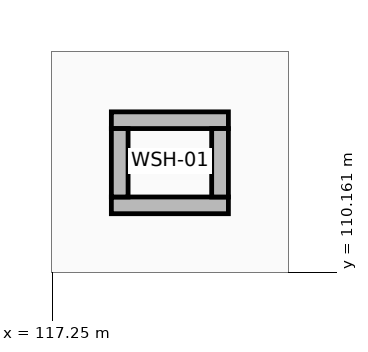
"""IFC4 building model, lengths in metres.
Left out: names, types, materials, properties, quantities, classifications, styles, units other than length and angle.
Written with IfcOpenShell. Run it as: python <this file> out.ifc"""

import sys

from ifc_helpers import new_model, si_unit, direction, frame, frame_2d, origin, place, context, subcontext, project, spatial, rectangle, extrude, element, save


model = new_model("IFC4")
c1 = context("Model", 3, precision=1e-05, world=origin(), true_north=direction((0.0, 1.0)))
c2 = subcontext(c1, "Body", "Model", "MODEL_VIEW")
j1 = project(units=[si_unit("LENGTHUNIT", "METRE"), si_unit("PLANEANGLEUNIT", "RADIAN")], contexts=[c1])
p1 = place(None, origin())
s1 = spatial("IfcSite", under=j1, at=p1, CompositionType="ELEMENT")
p2 = place(p1, origin())
s2 = spatial("IfcBuilding", under=s1, at=p2, CompositionType="ELEMENT")
p3 = place(p2, frame((0.0, 0.0, 35.4)))
s3 = spatial("IfcBuildingStorey", under=s2, at=p3, CompositionType="ELEMENT", Elevation=35.4)
for number, where, z_axis, x_axis in (
    (1, (118.03, 111.04, 0.0), (0.0, 0.0, 1.0), (1.0, 0.0, 0.0)),
    (2, (118.03, 112.16, 0.0), (0.0, 0.0, 1.0), (1.0, 0.0, 0.0)),
):
    element("IfcWall", number, at=place(p3, frame(where, z_axis=z_axis, x_axis=x_axis)), inside=s3, PredefinedType="STANDARD", context=c2, shape_type="SweptSolid", body=[
        extrude(rectangle(XDim=1.54, YDim=0.22, at=frame_2d((0.77, 0.0))), origin(), (0.0, 0.0, 1.0), 2.96),
    ])
for number, where, z_axis, x_axis in (
    (3, (118.14, 111.15, 0.0), (0.0, 0.0, 1.0), (0.0, 1.0, 0.0)),
    (4, (119.46, 111.15, 0.0), (0.0, 0.0, 1.0), (0.0, 1.0, 0.0)),
):
    element("IfcWall", number, at=place(p3, frame(where, z_axis=z_axis, x_axis=x_axis)), inside=s3, PredefinedType="STANDARD", context=c2, shape_type="SweptSolid", body=[
        extrude(rectangle(XDim=0.9, YDim=0.22, at=frame_2d((0.45, 0.0))), origin(), (0.0, 0.0, 1.0), 2.96),
    ])
save(model, sys.argv[1])
